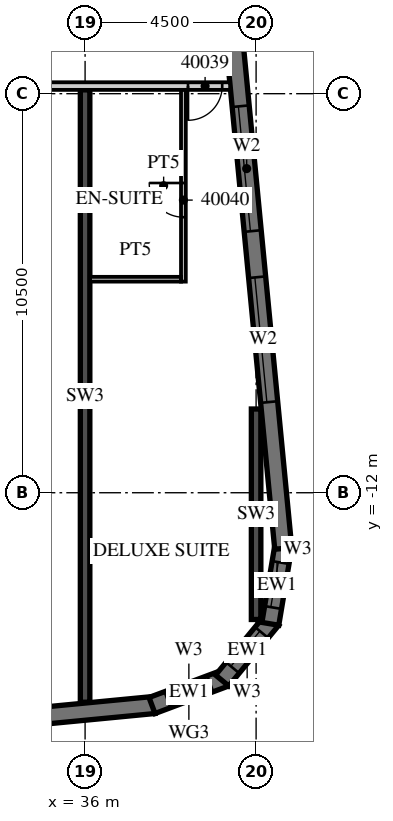
"""IFC4 building model, lengths in metres.
Left out: names, types, materials, properties, quantities, classifications, styles, units other than length and angle.
Written with IfcOpenShell. Run it as: python <this file> out.ifc"""

import sys

from ifc_helpers import new_model, si_unit, direction, frame, frame_2d, origin, place, context, subcontext, project, spatial, polyline, rectangle, outline, extrude, element, fill, save


model = new_model("IFC4")
c1 = context("Model", 3, precision=1e-05, world=origin(), true_north=direction((0.0, 1.0)))
c2 = subcontext(c1, "Body", "Model", "MODEL_VIEW")
j1 = project(units=[si_unit("LENGTHUNIT", "METRE"), si_unit("PLANEANGLEUNIT", "RADIAN")], contexts=[c1])
p1 = place(None, origin())
s1 = spatial("IfcSite", under=j1, at=p1, CompositionType="ELEMENT")
p2 = place(p1, origin())
s2 = spatial("IfcBuilding", under=s1, at=p2, CompositionType="ELEMENT")
p3 = place(p2, frame((0.0, 0.0, 173.5)))
s3 = spatial("IfcBuildingStorey", under=s2, at=p3, CompositionType="ELEMENT", Elevation=173.5)
p4 = place(p3, frame((36.0, -17.512, 0.0), z_axis=(0.0, 0.0, 1.0), x_axis=(0.0, 1.0, 0.0)))
e1 = element("IfcWall", 1, at=p4, inside=s3, PredefinedType="SHEAR", context=c2, shape_type="SweptSolid", body=[
    extrude(rectangle(XDim=16.112, YDim=0.25, at=frame_2d((8.056, 0.0))), origin(), (0.0, 0.0, 1.0), 3.3),
])
p5 = place(p3, frame((40.5, -15.335, 0.0), z_axis=(0.0, 0.0, 1.0), x_axis=(0.0, 1.0, 0.0)))
e2 = element("IfcWall", 2, at=p5, inside=s3, PredefinedType="SHEAR", context=c2, shape_type="SweptSolid", body=[
    extrude(rectangle(XDim=5.538, YDim=0.25, at=frame_2d((2.769, 0.0))), origin(), (0.0, 0.0, 1.0), 3.3),
])
p6 = place(p3, frame((-13.521, -22.529, 0.0), z_axis=(0.0, 0.0, 1.0), x_axis=(0.995396436651, 0.095843277819, 0.0)))
e3 = element("IfcWall", 3, at=p6, inside=s3, PredefinedType="SOLIDWALL", context=c2, shape_type="SweptSolid", body=[
    extrude(rectangle(XDim=51.578, YDim=0.45, at=frame_2d((25.789, 0.0))), origin(), (0.0, 0.0, 1.0), 3.02),
])
p7 = place(p6, frame((0.91, 0.0, 0.45)))
e4 = element("IfcOpeningElement", 4, at=p7, cuts=e3, PredefinedType="OPENING", context=c2, shape_type="SweptSolid", body=[
    extrude(rectangle(XDim=2.7, YDim=2.25, at=frame_2d((1.35, 1.125))), frame((0.0, 0.235, 0.0), z_axis=(0.0, -1.0, 0.0), x_axis=(1.0, 0.0, 0.0)), (0.0, 0.0, 1.0), 0.47),
])
p8 = place(p6, frame((5.431, 0.0, 0.45)))
e5 = element("IfcOpeningElement", 5, at=p8, cuts=e3, PredefinedType="OPENING", context=c2, shape_type="SweptSolid", body=[
    extrude(rectangle(XDim=2.7, YDim=2.25, at=frame_2d((1.35, 1.125))), frame((0.0, 0.235, 0.0), z_axis=(0.0, -1.0, 0.0), x_axis=(1.0, 0.0, 0.0)), (0.0, 0.0, 1.0), 0.47),
])
p9 = place(p6, frame((9.952, 0.0, 0.45)))
e6 = element("IfcOpeningElement", 6, at=p9, cuts=e3, PredefinedType="OPENING", context=c2, shape_type="SweptSolid", body=[
    extrude(rectangle(XDim=2.7, YDim=2.25, at=frame_2d((1.35, 1.125))), frame((0.0, 0.235, 0.0), z_axis=(0.0, -1.0, 0.0), x_axis=(1.0, 0.0, 0.0)), (0.0, 0.0, 1.0), 0.47),
])
p10 = place(p6, frame((14.473, 0.0, 0.45)))
e7 = element("IfcOpeningElement", 7, at=p10, cuts=e3, PredefinedType="OPENING", context=c2, shape_type="SweptSolid", body=[
    extrude(rectangle(XDim=2.7, YDim=2.25, at=frame_2d((1.35, 1.125))), frame((0.0, 0.235, 0.0), z_axis=(0.0, -1.0, 0.0), x_axis=(1.0, 0.0, 0.0)), (0.0, 0.0, 1.0), 0.47),
])
p11 = place(p6, frame((18.994, 0.0, 0.45)))
e8 = element("IfcOpeningElement", 8, at=p11, cuts=e3, PredefinedType="OPENING", context=c2, shape_type="SweptSolid", body=[
    extrude(rectangle(XDim=2.7, YDim=2.25, at=frame_2d((1.35, 1.125))), frame((0.0, 0.235, 0.0), z_axis=(0.0, -1.0, 0.0), x_axis=(1.0, 0.0, 0.0)), (0.0, 0.0, 1.0), 0.47),
])
p12 = place(p6, frame((23.514, 0.0, 0.45)))
e9 = element("IfcOpeningElement", 9, at=p12, cuts=e3, PredefinedType="OPENING", context=c2, shape_type="SweptSolid", body=[
    extrude(rectangle(XDim=2.7, YDim=2.25, at=frame_2d((1.35, 1.125))), frame((0.0, 0.235, 0.0), z_axis=(0.0, -1.0, 0.0), x_axis=(1.0, 0.0, 0.0)), (0.0, 0.0, 1.0), 0.47),
])
p13 = place(p6, frame((28.035, 0.0, 0.45)))
e10 = element("IfcOpeningElement", 10, at=p13, cuts=e3, PredefinedType="OPENING", context=c2, shape_type="SweptSolid", body=[
    extrude(rectangle(XDim=2.7, YDim=2.25, at=frame_2d((1.35, 1.125))), frame((0.0, 0.235, 0.0), z_axis=(0.0, -1.0, 0.0), x_axis=(1.0, 0.0, 0.0)), (0.0, 0.0, 1.0), 0.47),
])
p14 = place(p6, frame((32.556, 0.0, 0.45)))
e11 = element("IfcOpeningElement", 11, at=p14, cuts=e3, PredefinedType="OPENING", context=c2, shape_type="SweptSolid", body=[
    extrude(rectangle(XDim=2.7, YDim=2.25, at=frame_2d((1.35, 1.125))), frame((0.0, 0.235, 0.0), z_axis=(0.0, -1.0, 0.0), x_axis=(1.0, 0.0, 0.0)), (0.0, 0.0, 1.0), 0.47),
])
p15 = place(p6, frame((37.077, 0.0, 0.45)))
e12 = element("IfcOpeningElement", 12, at=p15, cuts=e3, PredefinedType="OPENING", context=c2, shape_type="SweptSolid", body=[
    extrude(rectangle(XDim=2.7, YDim=2.25, at=frame_2d((1.35, 1.125))), frame((0.0, 0.235, 0.0), z_axis=(0.0, -1.0, 0.0), x_axis=(1.0, 0.0, 0.0)), (0.0, 0.0, 1.0), 0.47),
])
p16 = place(p6, frame((41.598, 0.0, 0.45)))
e13 = element("IfcOpeningElement", 13, at=p16, cuts=e3, PredefinedType="OPENING", context=c2, shape_type="SweptSolid", body=[
    extrude(rectangle(XDim=2.7, YDim=2.25, at=frame_2d((1.35, 1.125))), frame((0.0, 0.235, 0.0), z_axis=(0.0, -1.0, 0.0), x_axis=(1.0, 0.0, 0.0)), (0.0, 0.0, 1.0), 0.47),
])
p17 = place(p6, frame((46.119, 0.0, 0.45)))
e14 = element("IfcOpeningElement", 14, at=p17, cuts=e3, PredefinedType="OPENING", context=c2, shape_type="SweptSolid", body=[
    extrude(rectangle(XDim=2.7, YDim=2.25, at=frame_2d((1.35, 1.125))), frame((0.0, 0.235, 0.0), z_axis=(0.0, -1.0, 0.0), x_axis=(1.0, 0.0, 0.0)), (0.0, 0.0, 1.0), 0.47),
])
p18 = place(p3, frame((37.761, -17.598, 0.0), z_axis=(0.0, 0.0, 1.0), x_axis=(0.936677599948, 0.350192909346, 0.0)))
e15 = element("IfcWall", 15, at=p18, inside=s3, PredefinedType="SOLIDWALL", context=c2, shape_type="SweptSolid", body=[
    extrude(outline(polyline([(0.0, -0.225), (2.071, -0.225), (1.95, 0.225), (0.121, 0.225), (0.0, -0.225)])), origin(), (0.0, 0.0, 1.0), 3.02),
])
p19 = place(p18, frame((0.435, 0.0, 0.45)))
e16 = element("IfcOpeningElement", 16, at=p19, cuts=e15, PredefinedType="OPENING", context=c2, shape_type="SweptSolid", body=[
    extrude(rectangle(XDim=1.2, YDim=2.25, at=frame_2d((0.6, 1.125))), frame((0.0, 0.235, 0.0), z_axis=(0.0, -1.0, 0.0), x_axis=(1.0, 0.0, 0.0)), (0.0, 0.0, 1.0), 0.47),
])
p20 = place(p3, frame((39.606, -16.941, 0.0), z_axis=(0.0, 0.0, 1.0), x_axis=(0.636116318187, 0.771593176315, 0.0)))
e17 = element("IfcWall", 17, at=p20, inside=s3, PredefinedType="SOLIDWALL", context=c2, shape_type="SweptSolid", body=[
    extrude(outline(polyline([(0.0, -0.225), (2.071, -0.225), (1.95, 0.225), (0.121, 0.225), (0.0, -0.225)])), origin(), (0.0, 0.0, 1.0), 3.02),
])
p21 = place(p20, frame((0.435, 0.0, 0.45)))
e18 = element("IfcOpeningElement", 18, at=p21, cuts=e17, PredefinedType="OPENING", context=c2, shape_type="SweptSolid", body=[
    extrude(rectangle(XDim=1.2, YDim=2.25, at=frame_2d((0.6, 1.125))), frame((0.0, 0.235, 0.0), z_axis=(0.0, -1.0, 0.0), x_axis=(1.0, 0.0, 0.0)), (0.0, 0.0, 1.0), 0.47),
])
p22 = place(p3, frame((40.875, -15.449, 0.0), z_axis=(0.0, 0.0, 1.0), x_axis=(0.164953448126, 0.986301353518, 0.0)))
e19 = element("IfcWall", 19, at=p22, inside=s3, PredefinedType="SOLIDWALL", context=c2, shape_type="SweptSolid", body=[
    extrude(outline(polyline([(0.0, -0.225), (2.071, -0.225), (1.95, 0.225), (0.121, 0.225), (0.0, -0.225)])), origin(), (0.0, 0.0, 1.0), 3.02),
])
p23 = place(p22, frame((0.435, 0.0, 0.45)))
e20 = element("IfcOpeningElement", 20, at=p23, cuts=e19, PredefinedType="OPENING", context=c2, shape_type="SweptSolid", body=[
    extrude(rectangle(XDim=1.2, YDim=2.25, at=frame_2d((0.6, 1.125))), frame((0.0, 0.235, 0.0), z_axis=(0.0, -1.0, 0.0), x_axis=(1.0, 0.0, 0.0)), (0.0, 0.0, 1.0), 0.47),
])
p24 = place(p3, frame((41.214, -13.466, 0.0), z_axis=(0.0, 0.0, 1.0), x_axis=(-0.095847314626, 0.995396047952, 0.0)))
e21 = element("IfcWall", 21, at=p24, inside=s3, PredefinedType="SOLIDWALL", context=c2, shape_type="SweptSolid", body=[
    extrude(rectangle(XDim=34.0, YDim=0.45, at=frame_2d((17.0, 0.0))), origin(), (0.0, 0.0, 1.0), 3.02),
])
p25 = place(p24, frame((3.869, 0.0, 0.45)))
e22 = element("IfcOpeningElement", 22, at=p25, cuts=e21, PredefinedType="OPENING", context=c2, shape_type="SweptSolid", body=[
    extrude(rectangle(XDim=3.3, YDim=2.25, at=frame_2d((1.65, 1.125))), frame((0.0, 0.235, 0.0), z_axis=(0.0, -1.0, 0.0), x_axis=(1.0, 0.0, 0.0)), (0.0, 0.0, 1.0), 0.47),
])
p26 = place(p24, frame((8.39, 0.0, 0.45)))
e23 = element("IfcOpeningElement", 23, at=p26, cuts=e21, PredefinedType="OPENING", context=c2, shape_type="SweptSolid", body=[
    extrude(rectangle(XDim=3.3, YDim=2.25, at=frame_2d((1.65, 1.125))), frame((0.0, 0.235, 0.0), z_axis=(0.0, -1.0, 0.0), x_axis=(1.0, 0.0, 0.0)), (0.0, 0.0, 1.0), 0.47),
])
p27 = place(p3, frame((13.5, -1.3, 0.0), z_axis=(0.0, 0.0, 1.0), x_axis=(1.0, 0.0, 0.0)))
e24 = element("IfcWall", 24, at=p27, inside=s3, PredefinedType="PARTITIONING", context=c2, shape_type="SweptSolid", body=[
    extrude(rectangle(XDim=26.317, YDim=0.2, at=frame_2d((13.158, 0.0))), origin(), (0.0, 0.0, 1.0), 3.02),
])
p28 = place(p27, frame((2.925, 0.0, 0.0)))
e25 = element("IfcOpeningElement", 25, at=p28, cuts=e24, PredefinedType="OPENING", context=c2, shape_type="SweptSolid", body=[
    extrude(rectangle(XDim=1.0, YDim=2.1, at=frame_2d((0.5, 1.05))), frame((0.0, 0.11, 0.0), z_axis=(0.0, -1.0, 0.0), x_axis=(1.0, 0.0, 0.0)), (0.0, 0.0, 1.0), 0.22),
])
p29 = place(p27, frame((5.075, 0.0, 0.0)))
e26 = element("IfcOpeningElement", 26, at=p29, cuts=e24, PredefinedType="OPENING", context=c2, shape_type="SweptSolid", body=[
    extrude(rectangle(XDim=1.0, YDim=2.1, at=frame_2d((0.5, 1.05))), frame((0.0, 0.11, 0.0), z_axis=(0.0, -1.0, 0.0), x_axis=(1.0, 0.0, 0.0)), (0.0, 0.0, 1.0), 0.22),
])
p30 = place(p27, frame((9.55, 0.0, 0.0)))
e27 = element("IfcOpeningElement", 27, at=p30, cuts=e24, PredefinedType="OPENING", context=c2, shape_type="SweptSolid", body=[
    extrude(rectangle(XDim=1.0, YDim=2.1, at=frame_2d((0.5, 1.05))), frame((0.0, 0.11, 0.0), z_axis=(0.0, -1.0, 0.0), x_axis=(1.0, 0.0, 0.0)), (0.0, 0.0, 1.0), 0.22),
])
p31 = place(p27, frame((18.862, 0.0, 0.0)))
e28 = element("IfcOpeningElement", 28, at=p31, cuts=e24, PredefinedType="OPENING", context=c2, shape_type="SweptSolid", body=[
    extrude(rectangle(XDim=1.2, YDim=2.1, at=frame_2d((0.6, 1.05))), frame((0.0, 0.11, 0.0), z_axis=(0.0, -1.0, 0.0), x_axis=(1.0, 0.0, 0.0)), (0.0, 0.0, 1.0), 0.22),
])
p32 = place(p27, frame((25.208, 0.0, 0.0)))
e29 = element("IfcOpeningElement", 29, at=p32, cuts=e24, PredefinedType="OPENING", context=c2, shape_type="SweptSolid", body=[
    extrude(rectangle(XDim=0.9, YDim=2.1, at=frame_2d((0.45, 1.05))), frame((0.0, 0.11, 0.0), z_axis=(0.0, -1.0, 0.0), x_axis=(1.0, 0.0, 0.0)), (0.0, 0.0, 1.0), 0.22),
])
p33 = place(p3, frame((38.587, -6.445, 0.0), z_axis=(0.0, 0.0, 1.0), x_axis=(0.0, 1.0, 0.0)))
e30 = element("IfcWall", 30, at=p33, inside=s3, PredefinedType="PARTITIONING", context=c2, shape_type="SweptSolid", body=[
    extrude(rectangle(XDim=5.045, YDim=0.125, at=frame_2d((2.522, 0.0))), origin(), (0.0, 0.0, 1.0), 3.02),
])
p34 = place(p33, frame((1.695, 0.0, 0.0)))
e31 = element("IfcOpeningElement", 31, at=p34, cuts=e30, PredefinedType="OPENING", context=c2, shape_type="SweptSolid", body=[
    extrude(rectangle(XDim=0.9, YDim=2.1, at=frame_2d((0.45, 1.05))), frame((0.0, 0.073, 0.0), z_axis=(0.0, -1.0, 0.0), x_axis=(1.0, 0.0, 0.0)), (0.0, 0.0, 1.0), 0.145),
])
p35 = place(p3, frame((36.125, -6.382, 0.0), z_axis=(0.0, 0.0, 1.0), x_axis=(1.0, 0.0, 0.0)))
e32 = element("IfcWall", 32, at=p35, inside=s3, PredefinedType="PARTITIONING", context=c2, shape_type="SweptSolid", body=[
    extrude(rectangle(XDim=2.4, YDim=0.125, at=frame_2d((1.2, 0.0))), origin(), (0.0, 0.0, 1.0), 3.02),
])
p36 = place(p19, origin())
e33 = element("IfcWindow", 33, at=p36, inside=s3, PartitioningType="SINGLE_PANEL", PredefinedType="WINDOW", context=c2, shape_type="SweptSolid", body=[
    extrude(rectangle(XDim=1.2, YDim=2.25, at=frame_2d((0.6, 1.125))), frame((0.0, 0.09, 0.0), z_axis=(0.0, -1.0, 0.0), x_axis=(1.0, 0.0, 0.0)), (0.0, 0.0, 1.0), 0.06),
])
fill(e16, e33)
p37 = place(p21, origin())
e34 = element("IfcWindow", 34, at=p37, inside=s3, PartitioningType="SINGLE_PANEL", PredefinedType="WINDOW", context=c2, shape_type="SweptSolid", body=[
    extrude(rectangle(XDim=1.2, YDim=2.25, at=frame_2d((0.6, 1.125))), frame((0.0, 0.09, 0.0), z_axis=(0.0, -1.0, 0.0), x_axis=(1.0, 0.0, 0.0)), (0.0, 0.0, 1.0), 0.06),
])
fill(e18, e34)
p38 = place(p23, origin())
e35 = element("IfcWindow", 35, at=p38, inside=s3, PartitioningType="SINGLE_PANEL", PredefinedType="WINDOW", context=c2, shape_type="SweptSolid", body=[
    extrude(rectangle(XDim=1.2, YDim=2.25, at=frame_2d((0.6, 1.125))), frame((0.0, 0.09, 0.0), z_axis=(0.0, -1.0, 0.0), x_axis=(1.0, 0.0, 0.0)), (0.0, 0.0, 1.0), 0.06),
])
fill(e20, e35)
p39 = place(p25, origin())
e36 = element("IfcWindow", 36, at=p39, inside=s3, PartitioningType="SINGLE_PANEL", PredefinedType="WINDOW", context=c2, shape_type="SweptSolid", body=[
    extrude(rectangle(XDim=3.3, YDim=2.25, at=frame_2d((1.65, 1.125))), frame((0.0, 0.09, 0.0), z_axis=(0.0, -1.0, 0.0), x_axis=(1.0, 0.0, 0.0)), (0.0, 0.0, 1.0), 0.06),
])
fill(e22, e36)
p40 = place(p26, origin())
e37 = element("IfcWindow", 37, at=p40, inside=s3, PartitioningType="SINGLE_PANEL", PredefinedType="WINDOW", context=c2, shape_type="SweptSolid", body=[
    extrude(rectangle(XDim=3.3, YDim=2.25, at=frame_2d((1.65, 1.125))), frame((0.0, 0.09, 0.0), z_axis=(0.0, -1.0, 0.0), x_axis=(1.0, 0.0, 0.0)), (0.0, 0.0, 1.0), 0.06),
])
fill(e23, e37)
p41 = place(p32, origin())
e38 = element("IfcDoor", 38, at=p41, inside=s3, OperationType="SINGLE_SWING_LEFT", PredefinedType="DOOR", context=c2, shape_type="SweptSolid", body=[
    extrude(rectangle(XDim=0.9, YDim=2.1, at=frame_2d((0.45, 1.05))), frame((0.0, 0.025, 0.0), z_axis=(0.0, -1.0, 0.0), x_axis=(1.0, 0.0, 0.0)), (0.0, 0.0, 1.0), 0.05),
])
fill(e29, e38)
p42 = place(p34, origin())
e39 = element("IfcDoor", 39, at=p42, inside=s3, OperationType="SINGLE_SWING_RIGHT", PredefinedType="DOOR", context=c2, shape_type="SweptSolid", body=[
    extrude(rectangle(XDim=0.9, YDim=2.1, at=frame_2d((0.45, 1.05))), frame((0.0, 0.025, 0.0), z_axis=(0.0, -1.0, 0.0), x_axis=(1.0, 0.0, 0.0)), (0.0, 0.0, 1.0), 0.05),
])
fill(e31, e39)
save(model, sys.argv[1])
